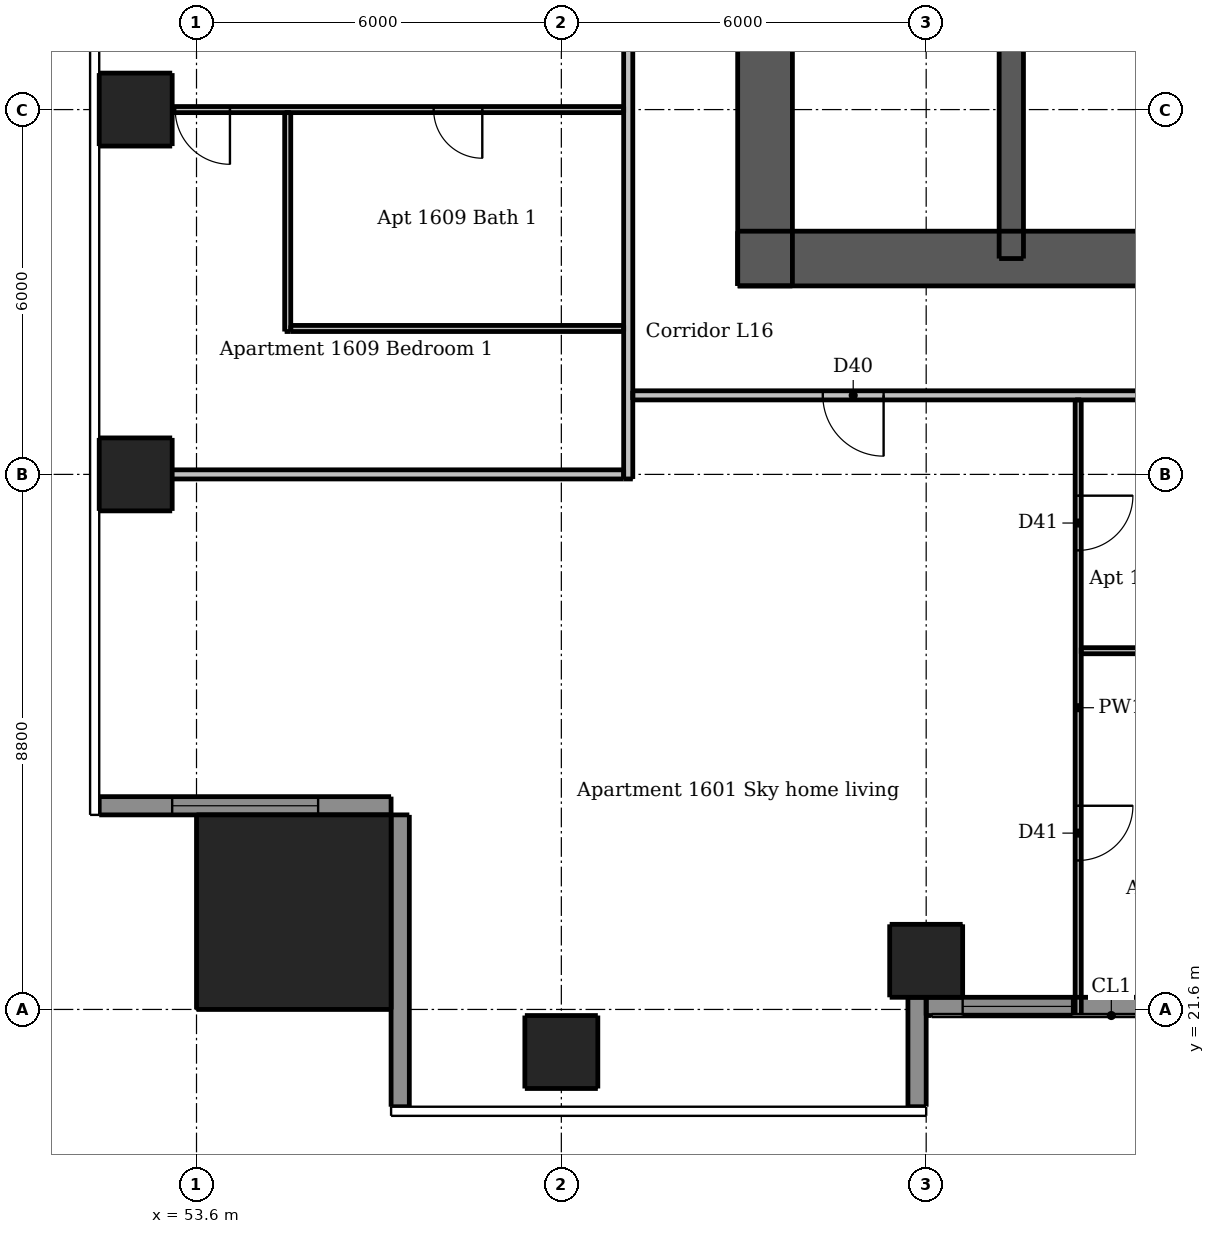
"""IFC4 building model, lengths in metres.
Left out: names, types, materials, properties, quantities, classifications, styles, units other than length and angle.
Written with IfcOpenShell. Run it as: python <this file> out.ifc"""

import sys

from ifc_helpers import new_model, si_unit, direction, frame, frame_2d, origin, origin_2d, place, context, subcontext, project, spatial, rectangle, extrude, element, fill, save


model = new_model("IFC4")
c1 = context("Model", 3, precision=1e-05, world=origin(), true_north=direction((0.0, 1.0)))
c2 = subcontext(c1, "Body", "Model", "MODEL_VIEW")
j1 = project(units=[si_unit("LENGTHUNIT", "METRE"), si_unit("PLANEANGLEUNIT", "RADIAN")], contexts=[c1])
p1 = place(None, origin())
s1 = spatial("IfcSite", under=j1, at=p1, CompositionType="ELEMENT")
p2 = place(p1, origin())
s2 = spatial("IfcBuilding", under=s1, at=p2, CompositionType="ELEMENT")
p3 = place(p2, frame((0.0, 0.0, 59.8)))
s3 = spatial("IfcBuildingStorey", under=s2, at=p3, CompositionType="ELEMENT", Elevation=59.8)
p4 = place(p3, frame((62.5, 33.95, 0.0), z_axis=(0.0, 0.0, 1.0), x_axis=(1.0, 0.0, 0.0)))
e1 = element("IfcWall", 1, at=p4, inside=s3, PredefinedType="SHEAR", context=c2, shape_type="SweptSolid", body=[
    extrude(rectangle(XDim=24.0, YDim=0.9, at=frame_2d((12.0, 0.0))), origin(), (0.0, 0.0, 1.0), 3.05),
])
p5 = place(p4, frame((2.05, 0.0, 0.0)))
e2 = element("IfcOpeningElement", 2, at=p5, cuts=e1, PredefinedType="OPENING", context=c2, shape_type="SweptSolid", body=[
    extrude(rectangle(XDim=1.1, YDim=2.1, at=frame_2d((0.55, 1.05))), frame((0.0, 0.46, 0.0), z_axis=(0.0, -1.0, 0.0), x_axis=(1.0, 0.0, 0.0)), (0.0, 0.0, 1.0), 0.92),
])
p6 = place(p4, frame((20.85, 0.0, 0.0)))
e3 = element("IfcOpeningElement", 3, at=p6, cuts=e1, PredefinedType="OPENING", context=c2, shape_type="SweptSolid", body=[
    extrude(rectangle(XDim=1.1, YDim=2.1, at=frame_2d((0.55, 1.05))), frame((0.0, 0.46, 0.0), z_axis=(0.0, -1.0, 0.0), x_axis=(1.0, 0.0, 0.0)), (0.0, 0.0, 1.0), 0.92),
])
p7 = place(p4, frame((8.0, 0.0, 0.0)))
e4 = element("IfcOpeningElement", 4, at=p7, cuts=e1, PredefinedType="OPENING", context=c2, shape_type="SweptSolid", body=[
    extrude(rectangle(XDim=1.1, YDim=2.1, at=frame_2d((0.55, 1.05))), frame((0.0, 0.46, 0.0), z_axis=(0.0, -1.0, 0.0), x_axis=(1.0, 0.0, 0.0)), (0.0, 0.0, 1.0), 0.92),
])
p8 = place(p4, frame((15.3, 0.0, 0.0)))
e5 = element("IfcOpeningElement", 5, at=p8, cuts=e1, PredefinedType="OPENING", context=c2, shape_type="SweptSolid", body=[
    extrude(rectangle(XDim=0.9, YDim=2.1, at=frame_2d((0.45, 1.05))), frame((0.0, 0.46, 0.0), z_axis=(0.0, -1.0, 0.0), x_axis=(1.0, 0.0, 0.0)), (0.0, 0.0, 1.0), 0.92),
])
p9 = place(p3, frame((62.95, 33.5, 0.0), z_axis=(0.0, 0.0, 1.0), x_axis=(0.0, 1.0, 0.0)))
e6 = element("IfcWall", 6, at=p9, inside=s3, PredefinedType="SHEAR", context=c2, shape_type="SweptSolid", body=[
    extrude(rectangle(XDim=24.0, YDim=0.9, at=frame_2d((12.0, 0.0))), origin(), (0.0, 0.0, 1.0), 3.05),
])
p10 = place(p9, frame((11.2, 0.0, 0.0)))
e7 = element("IfcOpeningElement", 7, at=p10, cuts=e6, PredefinedType="OPENING", context=c2, shape_type="SweptSolid", body=[
    extrude(rectangle(XDim=1.6, YDim=2.1, at=frame_2d((0.8, 1.05))), frame((0.0, 0.46, 0.0), z_axis=(0.0, -1.0, 0.0), x_axis=(1.0, 0.0, 0.0)), (0.0, 0.0, 1.0), 0.92),
])
p11 = place(p3, frame((67.0, 33.95, 0.0), z_axis=(0.0, 0.0, 1.0), x_axis=(0.0, 1.0, 0.0)))
e8 = element("IfcWall", 8, at=p11, inside=s3, PredefinedType="SHEAR", context=c2, shape_type="SweptSolid", body=[
    extrude(rectangle(XDim=9.95, YDim=0.4, at=frame_2d((4.975, 0.0))), origin(), (0.0, 0.0, 1.0), 3.05),
])
p12 = place(p11, frame((0.65, 0.0, 0.0)))
e9 = element("IfcOpeningElement", 9, at=p12, cuts=e8, PredefinedType="OPENING", context=c2, shape_type="SweptSolid", body=[
    extrude(rectangle(XDim=1.1, YDim=2.1, at=frame_2d((0.55, 1.05))), frame((0.0, 0.21, 0.0), z_axis=(0.0, -1.0, 0.0), x_axis=(1.0, 0.0, 0.0)), (0.0, 0.0, 1.0), 0.42),
])
for number, where, z_axis, x_axis in (
    (10, (59.6, 20.9, 0.0), (0.0, 0.0, 1.0), (1.0, 0.0, 0.0)),
    (11, (65.6, 22.4, 0.0), (0.0, 0.0, 1.0), (1.0, 0.0, 0.0)),
    (12, (52.6, 30.4, 0.0), (0.0, 0.0, 1.0), (1.0, 0.0, 0.0)),
    (13, (52.6, 36.4, 0.0), (0.0, 0.0, 1.0), (1.0, 0.0, 0.0)),
):
    element("IfcColumn", number, at=place(p3, frame(where, z_axis=z_axis, x_axis=x_axis)), inside=s3, PredefinedType="COLUMN", context=c2, shape_type="SweptSolid", body=[
        extrude(rectangle(XDim=1.2, YDim=1.2, at=origin_2d()), origin(), (0.0, 0.0, 1.0), 3.05),
    ])
p13 = place(p3, frame((55.2, 23.2, 0.0), z_axis=(0.0, 0.0, 1.0), x_axis=(1.0, 0.0, 0.0)))
e14 = element("IfcColumn", 14, at=p13, inside=s3, PredefinedType="COLUMN", context=c2, shape_type="SweptSolid", body=[
    extrude(rectangle(XDim=3.2, YDim=3.2, at=origin_2d()), origin(), (0.0, 0.0, 1.0), 3.3),
])
p14 = place(p3, frame((65.45, 20.0, 0.0), z_axis=(0.0, 0.0, 1.0), x_axis=(0.0, 1.0, 0.0)))
e15 = element("IfcWall", 15, at=p14, inside=s3, PredefinedType="SOLIDWALL", context=c2, shape_type="SweptSolid", body=[
    extrude(rectangle(XDim=1.8, YDim=0.3, at=frame_2d((0.9, 0.0))), origin(), (0.0, 0.0, 1.0), 3.05),
])
p15 = place(p3, frame((52.0, 24.95, 0.0), z_axis=(0.0, 0.0, 1.0), x_axis=(1.0, 0.0, 0.0)))
e16 = element("IfcWall", 16, at=p15, inside=s3, PredefinedType="SOLIDWALL", context=c2, shape_type="SweptSolid", body=[
    extrude(rectangle(XDim=4.8, YDim=0.3, at=frame_2d((2.4, 0.0))), origin(), (0.0, 0.0, 1.0), 3.05),
])
p16 = place(p15, frame((1.2, 0.0, 0.15)))
e17 = element("IfcOpeningElement", 17, at=p16, cuts=e16, PredefinedType="OPENING", context=c2, shape_type="SweptSolid", body=[
    extrude(rectangle(XDim=2.4, YDim=2.1, at=frame_2d((1.2, 1.05))), frame((0.0, 0.16, 0.0), z_axis=(0.0, -1.0, 0.0), x_axis=(1.0, 0.0, 0.0)), (0.0, 0.0, 1.0), 0.32),
])
p17 = place(p3, frame((56.95, 24.8, 0.0), z_axis=(0.0, 0.0, 1.0), x_axis=(0.0, -1.0, 0.0)))
e18 = element("IfcWall", 18, at=p17, inside=s3, PredefinedType="SOLIDWALL", context=c2, shape_type="SweptSolid", body=[
    extrude(rectangle(XDim=4.8, YDim=0.3, at=frame_2d((2.4, 0.0))), origin(), (0.0, 0.0, 1.0), 3.05),
])
p18 = place(p3, frame((65.6, 21.65, 0.0), z_axis=(0.0, 0.0, 1.0), x_axis=(1.0, 0.0, 0.0)))
e19 = element("IfcWall", 19, at=p18, inside=s3, PredefinedType="SOLIDWALL", context=c2, shape_type="SweptSolid", body=[
    extrude(rectangle(XDim=6.0, YDim=0.3, at=frame_2d((3.0, 0.0))), origin(), (0.0, 0.0, 1.0), 3.05),
])
p19 = place(p18, frame((0.6, 0.0, 0.15)))
e20 = element("IfcOpeningElement", 20, at=p19, cuts=e19, PredefinedType="OPENING", context=c2, shape_type="SweptSolid", body=[
    extrude(rectangle(XDim=1.8, YDim=2.1, at=frame_2d((0.9, 1.05))), frame((0.0, 0.16, 0.0), z_axis=(0.0, -1.0, 0.0), x_axis=(1.0, 0.0, 0.0)), (0.0, 0.0, 1.0), 0.32),
])
p20 = place(p18, frame((3.6, 0.0, 0.15)))
e21 = element("IfcOpeningElement", 21, at=p20, cuts=e19, PredefinedType="OPENING", context=c2, shape_type="SweptSolid", body=[
    extrude(rectangle(XDim=1.8, YDim=2.1, at=frame_2d((0.9, 1.05))), frame((0.0, 0.16, 0.0), z_axis=(0.0, -1.0, 0.0), x_axis=(1.0, 0.0, 0.0)), (0.0, 0.0, 1.0), 0.32),
])
p21 = place(p3, frame((55.1, 32.75, 0.0), z_axis=(0.0, 0.0, 1.0), x_axis=(0.0, 1.0, 0.0)))
e22 = element("IfcWall", 22, at=p21, inside=s3, PredefinedType="PARTITIONING", context=c2, shape_type="SweptSolid", body=[
    extrude(rectangle(XDim=3.6, YDim=0.1, at=frame_2d((1.8, 0.0))), origin(), (0.0, 0.0, 1.0), 3.05),
])
p22 = place(p3, frame((68.1, 31.625, 0.0), z_axis=(0.0, 0.0, 1.0), x_axis=(0.0, -1.0, 0.0)))
e23 = element("IfcWall", 23, at=p22, inside=s3, PredefinedType="PARTITIONING", context=c2, shape_type="SweptSolid", body=[
    extrude(rectangle(XDim=10.125, YDim=0.1, at=frame_2d((5.062, 0.0))), origin(), (0.0, 0.0, 1.0), 3.05),
])
p23 = place(p22, frame((1.575, 0.0, 0.0)))
e24 = element("IfcOpeningElement", 24, at=p23, cuts=e23, PredefinedType="OPENING", context=c2, shape_type="SweptSolid", body=[
    extrude(rectangle(XDim=0.9, YDim=2.1, at=frame_2d((0.45, 1.05))), frame((0.0, 0.06, 0.0), z_axis=(0.0, -1.0, 0.0), x_axis=(1.0, 0.0, 0.0)), (0.0, 0.0, 1.0), 0.12),
])
p24 = place(p22, frame((6.675, 0.0, 0.0)))
e25 = element("IfcOpeningElement", 25, at=p24, cuts=e23, PredefinedType="OPENING", context=c2, shape_type="SweptSolid", body=[
    extrude(rectangle(XDim=0.9, YDim=2.1, at=frame_2d((0.45, 1.05))), frame((0.0, 0.06, 0.0), z_axis=(0.0, -1.0, 0.0), x_axis=(1.0, 0.0, 0.0)), (0.0, 0.0, 1.0), 0.12),
])
p25 = place(p3, frame((60.625, 36.4, 0.0), z_axis=(0.0, 0.0, 1.0), x_axis=(-1.0, 0.0, 0.0)))
e26 = element("IfcWall", 26, at=p25, inside=s3, PredefinedType="PARTITIONING", context=c2, shape_type="SweptSolid", body=[
    extrude(rectangle(XDim=8.625, YDim=0.1, at=frame_2d((4.312, 0.0))), origin(), (0.0, 0.0, 1.0), 2.516),
])
p26 = place(p25, frame((6.475, 0.0, 0.0)))
e27 = element("IfcOpeningElement", 27, at=p26, cuts=e26, PredefinedType="OPENING", context=c2, shape_type="SweptSolid", body=[
    extrude(rectangle(XDim=0.9, YDim=2.1, at=frame_2d((0.45, 1.05))), frame((0.0, 0.06, 0.0), z_axis=(0.0, -1.0, 0.0), x_axis=(1.0, 0.0, 0.0)), (0.0, 0.0, 1.0), 0.12),
])
p27 = place(p25, frame((2.325, 0.0, 0.0)))
e28 = element("IfcOpeningElement", 28, at=p27, cuts=e26, PredefinedType="OPENING", context=c2, shape_type="SweptSolid", body=[
    extrude(rectangle(XDim=0.8, YDim=2.1, at=frame_2d((0.4, 1.05))), frame((0.0, 0.06, 0.0), z_axis=(0.0, -1.0, 0.0), x_axis=(1.0, 0.0, 0.0)), (0.0, 0.0, 1.0), 0.12),
])
p28 = place(p3, frame((55.15, 32.8, 0.0), z_axis=(0.0, 0.0, 1.0), x_axis=(1.0, 0.0, 0.0)))
e29 = element("IfcWall", 29, at=p28, inside=s3, PredefinedType="PARTITIONING", context=c2, shape_type="SweptSolid", body=[
    extrude(rectangle(XDim=5.475, YDim=0.1, at=frame_2d((2.738, 0.0))), origin(), (0.0, 0.0, 1.0), 3.05),
])
p29 = place(p3, frame((68.15, 27.5, 0.0), z_axis=(0.0, 0.0, 1.0), x_axis=(1.0, 0.0, 0.0)))
e30 = element("IfcWall", 30, at=p29, inside=s3, PredefinedType="PARTITIONING", context=c2, shape_type="SweptSolid", body=[
    extrude(rectangle(XDim=6.375, YDim=0.1, at=frame_2d((3.188, 0.0))), origin(), (0.0, 0.0, 1.0), 3.05),
])
p30 = place(p29, frame((4.0, 0.0, 0.0)))
e31 = element("IfcOpeningElement", 31, at=p30, cuts=e30, PredefinedType="OPENING", context=c2, shape_type="SweptSolid", body=[
    extrude(rectangle(XDim=0.8, YDim=2.1, at=frame_2d((0.4, 1.05))), frame((0.0, 0.06, 0.0), z_axis=(0.0, -1.0, 0.0), x_axis=(1.0, 0.0, 0.0)), (0.0, 0.0, 1.0), 0.12),
])
p31 = place(p3, frame((60.7, 30.325, 0.0), z_axis=(0.0, 0.0, 1.0), x_axis=(0.0, 1.0, 0.0)))
e32 = element("IfcWall", 32, at=p31, inside=s3, PredefinedType="PARTITIONING", context=c2, shape_type="SweptSolid", body=[
    extrude(rectangle(XDim=28.9, YDim=0.15, at=frame_2d((14.45, 0.0))), origin(), (0.0, 0.0, 1.0), 3.05),
])
p32 = place(p31, frame((7.375, 0.0, 0.0)))
e33 = element("IfcOpeningElement", 33, at=p32, cuts=e32, PredefinedType="OPENING", context=c2, shape_type="SweptSolid", body=[
    extrude(rectangle(XDim=1.0, YDim=2.1, at=frame_2d((0.5, 1.05))), frame((0.0, 0.085, 0.0), z_axis=(0.0, -1.0, 0.0), x_axis=(1.0, 0.0, 0.0)), (0.0, 0.0, 1.0), 0.17),
])
p33 = place(p31, frame((14.575, 0.0, 0.0)))
e34 = element("IfcOpeningElement", 34, at=p33, cuts=e32, PredefinedType="OPENING", context=c2, shape_type="SweptSolid", body=[
    extrude(rectangle(XDim=1.0, YDim=2.1, at=frame_2d((0.5, 1.05))), frame((0.0, 0.085, 0.0), z_axis=(0.0, -1.0, 0.0), x_axis=(1.0, 0.0, 0.0)), (0.0, 0.0, 1.0), 0.17),
])
p34 = place(p31, frame((26.025, 0.0, 0.0)))
e35 = element("IfcOpeningElement", 35, at=p34, cuts=e32, PredefinedType="OPENING", context=c2, shape_type="SweptSolid", body=[
    extrude(rectangle(XDim=1.0, YDim=2.1, at=frame_2d((0.5, 1.05))), frame((0.0, 0.085, 0.0), z_axis=(0.0, -1.0, 0.0), x_axis=(1.0, 0.0, 0.0)), (0.0, 0.0, 1.0), 0.17),
])
p35 = place(p3, frame((89.525, 31.7, 0.0), z_axis=(0.0, 0.0, 1.0), x_axis=(-1.0, 0.0, 0.0)))
e36 = element("IfcWall", 36, at=p35, inside=s3, PredefinedType="PARTITIONING", context=c2, shape_type="SweptSolid", body=[
    extrude(rectangle(XDim=28.75, YDim=0.15, at=frame_2d((14.375, 0.0))), origin(), (0.0, 0.0, 1.0), 3.05),
])
p36 = place(p35, frame((24.625, 0.0, 0.0)))
e37 = element("IfcOpeningElement", 37, at=p36, cuts=e36, PredefinedType="OPENING", context=c2, shape_type="SweptSolid", body=[
    extrude(rectangle(XDim=1.0, YDim=2.1, at=frame_2d((0.5, 1.05))), frame((0.0, 0.085, 0.0), z_axis=(0.0, -1.0, 0.0), x_axis=(1.0, 0.0, 0.0)), (0.0, 0.0, 1.0), 0.17),
])
p37 = place(p35, frame((8.425, 0.0, 0.0)))
e38 = element("IfcOpeningElement", 38, at=p37, cuts=e36, PredefinedType="OPENING", context=c2, shape_type="SweptSolid", body=[
    extrude(rectangle(XDim=1.0, YDim=2.1, at=frame_2d((0.5, 1.05))), frame((0.0, 0.085, 0.0), z_axis=(0.0, -1.0, 0.0), x_axis=(1.0, 0.0, 0.0)), (0.0, 0.0, 1.0), 0.17),
])
p38 = place(p3, frame((52.0, 30.4, 0.0), z_axis=(0.0, 0.0, 1.0), x_axis=(1.0, 0.0, 0.0)))
e39 = element("IfcWall", 39, at=p38, inside=s3, PredefinedType="PARTITIONING", context=c2, shape_type="SweptSolid", body=[
    extrude(rectangle(XDim=8.625, YDim=0.15, at=frame_2d((4.312, 0.0))), origin(), (0.0, 0.0, 1.0), 2.647),
])
p39 = place(p16, origin())
e40 = element("IfcWindow", 40, at=p39, inside=s3, PartitioningType="DOUBLE_PANEL_VERTICAL", PredefinedType="WINDOW", context=c2, shape_type="SweptSolid", body=[
    extrude(rectangle(XDim=2.4, YDim=2.1, at=frame_2d((1.2, 1.05))), frame((0.0, 0.03, 0.0), z_axis=(0.0, -1.0, 0.0), x_axis=(1.0, 0.0, 0.0)), (0.0, 0.0, 1.0), 0.06),
])
fill(e17, e40)
p40 = place(p19, origin())
e41 = element("IfcWindow", 41, at=p40, inside=s3, PartitioningType="DOUBLE_PANEL_VERTICAL", PredefinedType="WINDOW", context=c2, shape_type="SweptSolid", body=[
    extrude(rectangle(XDim=1.8, YDim=2.1, at=frame_2d((0.9, 1.05))), frame((0.0, 0.03, 0.0), z_axis=(0.0, -1.0, 0.0), x_axis=(1.0, 0.0, 0.0)), (0.0, 0.0, 1.0), 0.06),
])
fill(e20, e41)
p41 = place(p5, origin())
e42 = element("IfcDoor", 42, at=p41, inside=s3, OperationType="SINGLE_SWING_LEFT", PredefinedType="DOOR", context=c2, shape_type="SweptSolid", body=[
    extrude(rectangle(XDim=1.1, YDim=2.1, at=frame_2d((0.55, 1.05))), frame((0.0, 0.438, 0.0), z_axis=(0.0, -1.0, 0.0), x_axis=(1.0, 0.0, 0.0)), (0.0, 0.0, 1.0), 0.05),
])
fill(e2, e42)
p42 = place(p12, origin())
e43 = element("IfcDoor", 43, at=p42, inside=s3, OperationType="SINGLE_SWING_RIGHT", PredefinedType="DOOR", context=c2, shape_type="SweptSolid", body=[
    extrude(rectangle(XDim=1.1, YDim=2.1, at=frame_2d((0.55, 1.05))), frame((0.0, -0.138, 0.0), z_axis=(0.0, -1.0, 0.0), x_axis=(1.0, 0.0, 0.0)), (0.0, 0.0, 1.0), 0.05),
])
fill(e9, e43)
p43 = place(p36, origin())
e44 = element("IfcDoor", 44, at=p43, inside=s3, OperationType="SINGLE_SWING_LEFT", PredefinedType="DOOR", context=c2, shape_type="SweptSolid", body=[
    extrude(rectangle(XDim=1.0, YDim=2.1, at=frame_2d((0.5, 1.05))), frame((0.0, 0.025, 0.0), z_axis=(0.0, -1.0, 0.0), x_axis=(1.0, 0.0, 0.0)), (0.0, 0.0, 1.0), 0.05),
])
fill(e37, e44)
p44 = place(p23, origin())
e45 = element("IfcDoor", 45, at=p44, inside=s3, OperationType="SINGLE_SWING_LEFT", PredefinedType="DOOR", context=c2, shape_type="SweptSolid", body=[
    extrude(rectangle(XDim=0.9, YDim=2.1, at=frame_2d((0.45, 1.05))), frame((0.0, 0.025, 0.0), z_axis=(0.0, -1.0, 0.0), x_axis=(1.0, 0.0, 0.0)), (0.0, 0.0, 1.0), 0.05),
])
fill(e24, e45)
p45 = place(p24, origin())
e46 = element("IfcDoor", 46, at=p45, inside=s3, OperationType="SINGLE_SWING_LEFT", PredefinedType="DOOR", context=c2, shape_type="SweptSolid", body=[
    extrude(rectangle(XDim=0.9, YDim=2.1, at=frame_2d((0.45, 1.05))), frame((0.0, 0.025, 0.0), z_axis=(0.0, -1.0, 0.0), x_axis=(1.0, 0.0, 0.0)), (0.0, 0.0, 1.0), 0.05),
])
fill(e25, e46)
p46 = place(p26, origin())
e47 = element("IfcDoor", 47, at=p46, inside=s3, OperationType="SINGLE_SWING_LEFT", PredefinedType="DOOR", context=c2, shape_type="SweptSolid", body=[
    extrude(rectangle(XDim=0.9, YDim=2.1, at=frame_2d((0.45, 1.05))), frame((0.0, 0.025, 0.0), z_axis=(0.0, -1.0, 0.0), x_axis=(1.0, 0.0, 0.0)), (0.0, 0.0, 1.0), 0.05),
])
fill(e27, e47)
p47 = place(p27, origin())
e48 = element("IfcDoor", 48, at=p47, inside=s3, OperationType="SINGLE_SWING_LEFT", PredefinedType="DOOR", context=c2, shape_type="SweptSolid", body=[
    extrude(rectangle(XDim=0.8, YDim=2.1, at=frame_2d((0.4, 1.05))), frame((0.0, 0.025, 0.0), z_axis=(0.0, -1.0, 0.0), x_axis=(1.0, 0.0, 0.0)), (0.0, 0.0, 1.0), 0.05),
])
fill(e28, e48)
save(model, sys.argv[1])
